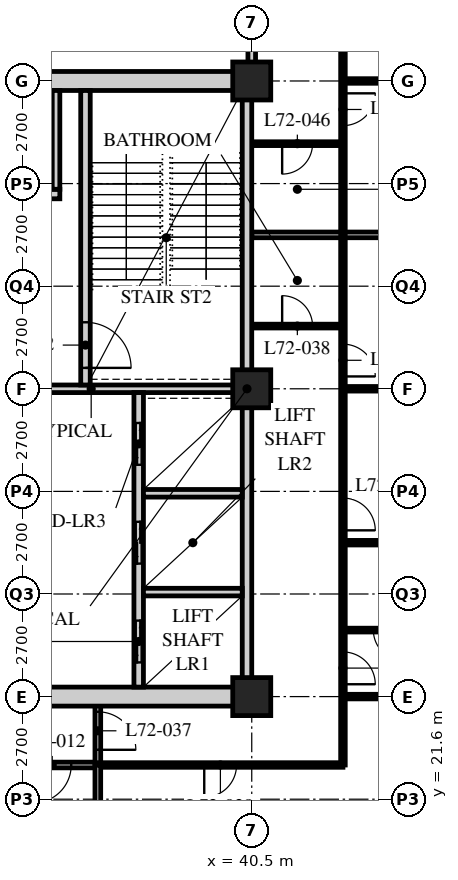
"""IFC4 building model, lengths in metres.
Left out: names, types, materials, properties, quantities, classifications, styles, units other than length and angle.
Written with IfcOpenShell. Run it as: python <this file> out.ifc"""

import sys

from ifc_helpers import new_model, si_unit, direction, frame, frame_2d, origin, origin_2d, place, context, subcontext, project, spatial, rectangle, hollow_rectangle, extrude, element, fill, save


model = new_model("IFC4")
c1 = context("Model", 3, precision=1e-05, world=origin(), true_north=direction((0.0, 1.0)))
c2 = subcontext(c1, "Body", "Model", "MODEL_VIEW")
j1 = project(units=[si_unit("LENGTHUNIT", "METRE"), si_unit("PLANEANGLEUNIT", "RADIAN")], contexts=[c1])
p1 = place(None, origin())
s1 = spatial("IfcSite", under=j1, at=p1, CompositionType="ELEMENT")
p2 = place(p1, origin())
s2 = spatial("IfcBuilding", under=s1, at=p2, CompositionType="ELEMENT")
p3 = place(p2, frame((0.0, 0.0, 281.4)))
s3 = spatial("IfcBuildingStorey", under=s2, at=p3, CompositionType="ELEMENT", Elevation=281.4)
for number, where, z_axis, x_axis in (
    (1, (40.5, 24.3, 0.0), (0.0, 0.0, 1.0), (1.0, 0.0, 0.0)),
    (2, (40.5, 32.4, 0.0), (0.0, 0.0, 1.0), (1.0, 0.0, 0.0)),
    (3, (40.5, 40.5, 0.0), (0.0, 0.0, 1.0), (1.0, 0.0, 0.0)),
):
    element("IfcColumn", number, at=place(p3, frame(where, z_axis=z_axis, x_axis=x_axis)), inside=s3, PredefinedType="COLUMN", context=c2, shape_type="SweptSolid", body=[
        extrude(hollow_rectangle(XDim=1.0, YDim=1.0, WallThickness=0.1, at=origin_2d()), origin(), (0.0, 0.0, 1.0), 3.9),
    ])
p4 = place(p3, frame((12.15, 22.5, 0.0), z_axis=(0.0, 0.0, 1.0), x_axis=(1.0, 0.0, 0.0)))
e4 = element("IfcWall", 4, at=p4, inside=s3, PredefinedType="PARTITIONING", context=c2, shape_type="SweptSolid", body=[
    extrude(rectangle(XDim=24.3, YDim=0.15, at=frame_2d((12.15, 0.0))), origin(), (0.0, 0.0, 1.0), 3.69),
])
p5 = place(p4, frame((4.45, 0.0, 0.0)))
e5 = element("IfcOpeningElement", 5, at=p5, cuts=e4, PredefinedType="OPENING", context=c2, shape_type="SweptSolid", body=[
    extrude(rectangle(XDim=1.0, YDim=2.1, at=frame_2d((0.5, 1.05))), frame((0.0, 0.085, 0.0), z_axis=(0.0, -1.0, 0.0), x_axis=(1.0, 0.0, 0.0)), (0.0, 0.0, 1.0), 0.17),
])
p6 = place(p4, frame((22.6, 0.0, 0.0)))
e6 = element("IfcOpeningElement", 6, at=p6, cuts=e4, PredefinedType="OPENING", context=c2, shape_type="SweptSolid", body=[
    extrude(rectangle(XDim=1.0, YDim=2.1, at=frame_2d((0.5, 1.05))), frame((0.0, 0.085, 0.0), z_axis=(0.0, -1.0, 0.0), x_axis=(1.0, 0.0, 0.0)), (0.0, 0.0, 1.0), 0.17),
])
p7 = place(p4, frame((2.625, 0.0, 0.0)))
e7 = element("IfcOpeningElement", 7, at=p7, cuts=e4, PredefinedType="OPENING", context=c2, shape_type="SweptSolid", body=[
    extrude(rectangle(XDim=1.0, YDim=2.1, at=frame_2d((0.5, 1.05))), frame((0.0, 0.085, 0.0), z_axis=(0.0, -1.0, 0.0), x_axis=(1.0, 0.0, 0.0)), (0.0, 0.0, 1.0), 0.17),
])
p8 = place(p3, frame((36.45, 22.5, 0.0), z_axis=(0.0, 0.0, 1.0), x_axis=(0.0, 1.0, 0.0)))
e8 = element("IfcWall", 8, at=p8, inside=s3, PredefinedType="PARTITIONING", context=c2, shape_type="SweptSolid", body=[
    extrude(rectangle(XDim=1.8, YDim=0.15, at=frame_2d((0.9, 0.0))), origin(), (0.0, 0.0, 1.0), 3.69),
])
p9 = place(p8, frame((0.4, 0.0, 0.0)))
e9 = element("IfcOpeningElement", 9, at=p9, cuts=e8, PredefinedType="OPENING", context=c2, shape_type="SweptSolid", body=[
    extrude(rectangle(XDim=1.0, YDim=2.1, at=frame_2d((0.5, 1.05))), frame((0.0, 0.085, 0.0), z_axis=(0.0, -1.0, 0.0), x_axis=(1.0, 0.0, 0.0)), (0.0, 0.0, 1.0), 0.17),
])
p10 = place(p3, frame((40.5, 40.5, 0.0), z_axis=(0.0, 0.0, 1.0), x_axis=(0.0, 1.0, 0.0)))
e10 = element("IfcWall", 10, at=p10, inside=s3, PredefinedType="SOLIDWALL", context=c2, shape_type="SweptSolid", body=[
    extrude(rectangle(XDim=6.3, YDim=0.2, at=frame_2d((3.15, 0.0))), origin(), (0.0, 0.0, 1.0), 3.078),
])
p11 = place(p3, frame((40.5, 34.05, 0.0), z_axis=(0.0, 0.0, 1.0), x_axis=(1.0, 0.0, 0.0)))
e11 = element("IfcWall", 11, at=p11, inside=s3, PredefinedType="PARTITIONING", context=c2, shape_type="SweptSolid", body=[
    extrude(rectangle(XDim=2.4, YDim=0.1, at=frame_2d((1.2, 0.0))), origin(), (0.0, 0.0, 1.0), 3.69),
])
p12 = place(p11, frame((0.8, 0.0, 0.0)))
e12 = element("IfcOpeningElement", 12, at=p12, cuts=e11, PredefinedType="OPENING", context=c2, shape_type="SweptSolid", body=[
    extrude(rectangle(XDim=0.8, YDim=2.1, at=frame_2d((0.4, 1.05))), frame((0.0, 0.06, 0.0), z_axis=(0.0, -1.0, 0.0), x_axis=(1.0, 0.0, 0.0)), (0.0, 0.0, 1.0), 0.12),
])
p13 = place(p3, frame((42.9, 22.5, 0.0), z_axis=(0.0, 0.0, 1.0), x_axis=(0.0, 1.0, 0.0)))
e13 = element("IfcWall", 13, at=p13, inside=s3, PredefinedType="PARTITIONING", context=c2, shape_type="SweptSolid", body=[
    extrude(rectangle(XDim=13.95, YDim=0.12, at=frame_2d((6.975, 0.0))), origin(), (0.0, 0.0, 1.0), 3.69),
])
p14 = place(p13, frame((2.125, 0.0, 0.0)))
e14 = element("IfcOpeningElement", 14, at=p14, cuts=e13, PredefinedType="OPENING", context=c2, shape_type="SweptSolid", body=[
    extrude(rectangle(XDim=0.85, YDim=2.1, at=frame_2d((0.425, 1.05))), frame((0.0, 0.07, 0.0), z_axis=(0.0, -1.0, 0.0), x_axis=(1.0, 0.0, 0.0)), (0.0, 0.0, 1.0), 0.14),
])
p15 = place(p13, frame((6.175, 0.0, 0.0)))
e15 = element("IfcOpeningElement", 15, at=p15, cuts=e13, PredefinedType="OPENING", context=c2, shape_type="SweptSolid", body=[
    extrude(rectangle(XDim=0.85, YDim=2.1, at=frame_2d((0.425, 1.05))), frame((0.0, 0.07, 0.0), z_axis=(0.0, -1.0, 0.0), x_axis=(1.0, 0.0, 0.0)), (0.0, 0.0, 1.0), 0.14),
])
p16 = place(p13, frame((10.225, 0.0, 0.0)))
e16 = element("IfcOpeningElement", 16, at=p16, cuts=e13, PredefinedType="OPENING", context=c2, shape_type="SweptSolid", body=[
    extrude(rectangle(XDim=0.85, YDim=2.1, at=frame_2d((0.425, 1.05))), frame((0.0, 0.07, 0.0), z_axis=(0.0, -1.0, 0.0), x_axis=(1.0, 0.0, 0.0)), (0.0, 0.0, 1.0), 0.14),
])
p17 = place(p3, frame((36.45, 22.5, 0.0), z_axis=(0.0, 0.0, 1.0), x_axis=(1.0, 0.0, 0.0)))
e17 = element("IfcWall", 17, at=p17, inside=s3, PredefinedType="PARTITIONING", context=c2, shape_type="SweptSolid", body=[
    extrude(rectangle(XDim=6.45, YDim=0.12, at=frame_2d((3.225, 0.0))), origin(), (0.0, 0.0, 1.0), 3.69),
])
p18 = place(p17, frame((2.8, 0.0, 0.0)))
e18 = element("IfcOpeningElement", 18, at=p18, cuts=e17, PredefinedType="OPENING", context=c2, shape_type="SweptSolid", body=[
    extrude(rectangle(XDim=0.85, YDim=2.1, at=frame_2d((0.425, 1.05))), frame((0.0, 0.07, 0.0), z_axis=(0.0, -1.0, 0.0), x_axis=(1.0, 0.0, 0.0)), (0.0, 0.0, 1.0), 0.14),
])
p19 = place(p3, frame((42.9, 24.3, 0.0), z_axis=(0.0, 0.0, 1.0), x_axis=(1.0, 0.0, 0.0)))
e19 = element("IfcWall", 19, at=p19, inside=s3, PredefinedType="PARTITIONING", context=c2, shape_type="SweptSolid", body=[
    extrude(rectangle(XDim=9.45, YDim=0.12, at=frame_2d((4.725, 0.0))), origin(), (0.0, 0.0, 1.0), 3.078),
])
p20 = place(p3, frame((40.5, 36.45, 0.0), z_axis=(0.0, 0.0, 1.0), x_axis=(1.0, 0.0, 0.0)))
e20 = element("IfcWall", 20, at=p20, inside=s3, PredefinedType="PARTITIONING", context=c2, shape_type="SweptSolid", body=[
    extrude(rectangle(XDim=15.9, YDim=0.15, at=frame_2d((7.95, 0.0))), origin(), (0.0, 0.0, 1.0), 3.69),
])
p21 = place(p3, frame((36.45, 16.5, 0.0), z_axis=(0.0, 0.0, 1.0), x_axis=(0.0, 1.0, 0.0)))
e21 = element("IfcWall", 21, at=p21, inside=s3, PredefinedType="PARTITIONING", context=c2, shape_type="SweptSolid", body=[
    extrude(rectangle(XDim=6.0, YDim=0.15, at=frame_2d((3.0, 0.0))), origin(), (0.0, 0.0, 1.0), 3.69),
])
p22 = place(p3, frame((42.9, 26.05, 0.0), z_axis=(0.0, 0.0, 1.0), x_axis=(1.0, 0.0, 0.0)))
e22 = element("IfcWall", 22, at=p22, inside=s3, PredefinedType="PARTITIONING", context=c2, shape_type="SweptSolid", body=[
    extrude(rectangle(XDim=2.4, YDim=0.1, at=frame_2d((1.2, 0.0))), origin(), (0.0, 0.0, 1.0), 3.69),
])
p23 = place(p22, frame((0.8, 0.0, 0.0)))
e23 = element("IfcOpeningElement", 23, at=p23, cuts=e22, PredefinedType="OPENING", context=c2, shape_type="SweptSolid", body=[
    extrude(rectangle(XDim=0.8, YDim=2.1, at=frame_2d((0.4, 1.05))), frame((0.0, 0.06, 0.0), z_axis=(0.0, -1.0, 0.0), x_axis=(1.0, 0.0, 0.0)), (0.0, 0.0, 1.0), 0.12),
])
p24 = place(p3, frame((42.9, 28.35, 0.0), z_axis=(0.0, 0.0, 1.0), x_axis=(1.0, 0.0, 0.0)))
e24 = element("IfcWall", 24, at=p24, inside=s3, PredefinedType="PARTITIONING", context=c2, shape_type="SweptSolid", body=[
    extrude(rectangle(XDim=13.5, YDim=0.12, at=frame_2d((6.75, 0.0))), origin(), (0.0, 0.0, 1.0), 3.69),
])
p25 = place(p3, frame((42.9, 32.4, 0.0), z_axis=(0.0, 0.0, 1.0), x_axis=(1.0, 0.0, 0.0)))
e25 = element("IfcWall", 25, at=p25, inside=s3, PredefinedType="PARTITIONING", context=c2, shape_type="SweptSolid", body=[
    extrude(rectangle(XDim=13.5, YDim=0.12, at=frame_2d((6.75, 0.0))), origin(), (0.0, 0.0, 1.0), 3.078),
])
p26 = place(p3, frame((40.5, 38.85, 0.0), z_axis=(0.0, 0.0, 1.0), x_axis=(1.0, 0.0, 0.0)))
e26 = element("IfcWall", 26, at=p26, inside=s3, PredefinedType="PARTITIONING", context=c2, shape_type="SweptSolid", body=[
    extrude(rectangle(XDim=2.4, YDim=0.1, at=frame_2d((1.2, 0.0))), origin(), (0.0, 0.0, 1.0), 3.69),
])
p27 = place(p26, frame((0.8, 0.0, 0.0)))
e27 = element("IfcOpeningElement", 27, at=p27, cuts=e26, PredefinedType="OPENING", context=c2, shape_type="SweptSolid", body=[
    extrude(rectangle(XDim=0.8, YDim=2.1, at=frame_2d((0.4, 1.05))), frame((0.0, 0.06, 0.0), z_axis=(0.0, -1.0, 0.0), x_axis=(1.0, 0.0, 0.0)), (0.0, 0.0, 1.0), 0.12),
])
p28 = place(p3, frame((42.9, 48.6, 0.0), z_axis=(0.0, 0.0, 1.0), x_axis=(0.0, -1.0, 0.0)))
e28 = element("IfcWall", 28, at=p28, inside=s3, PredefinedType="PARTITIONING", context=c2, shape_type="SweptSolid", body=[
    extrude(rectangle(XDim=12.15, YDim=0.12, at=frame_2d((6.075, 0.0))), origin(), (0.0, 0.0, 1.0), 3.69),
])
p29 = place(p28, frame((2.125, 0.0, 0.0)))
e29 = element("IfcOpeningElement", 29, at=p29, cuts=e28, PredefinedType="OPENING", context=c2, shape_type="SweptSolid", body=[
    extrude(rectangle(XDim=0.85, YDim=2.1, at=frame_2d((0.425, 1.05))), frame((0.0, 0.07, 0.0), z_axis=(0.0, -1.0, 0.0), x_axis=(1.0, 0.0, 0.0)), (0.0, 0.0, 1.0), 0.14),
])
p30 = place(p28, frame((8.425, 0.0, 0.0)))
e30 = element("IfcOpeningElement", 30, at=p30, cuts=e28, PredefinedType="OPENING", context=c2, shape_type="SweptSolid", body=[
    extrude(rectangle(XDim=0.85, YDim=2.1, at=frame_2d((0.425, 1.05))), frame((0.0, 0.07, 0.0), z_axis=(0.0, -1.0, 0.0), x_axis=(1.0, 0.0, 0.0)), (0.0, 0.0, 1.0), 0.14),
])
p31 = place(p3, frame((42.9, 40.5, 0.0), z_axis=(0.0, 0.0, 1.0), x_axis=(1.0, 0.0, 0.0)))
e31 = element("IfcWall", 31, at=p31, inside=s3, PredefinedType="PARTITIONING", context=c2, shape_type="SweptSolid", body=[
    extrude(rectangle(XDim=13.5, YDim=0.12, at=frame_2d((6.75, 0.0))), origin(), (0.0, 0.0, 1.0), 3.078),
])
p32 = place(p3, frame((15.95, 24.3, 0.0), z_axis=(0.0, 0.0, 1.0), x_axis=(1.0, 0.0, 0.0)))
e32 = element("IfcWall", 32, at=p32, inside=s3, PredefinedType="SOLIDWALL", context=c2, shape_type="SweptSolid", body=[
    extrude(rectangle(XDim=24.55, YDim=0.5, at=frame_2d((12.275, 0.0))), origin(), (0.0, 0.0, 1.0), 3.04),
])
p33 = place(p32, frame((11.5, 0.0, 0.0)))
e33 = element("IfcOpeningElement", 33, at=p33, cuts=e32, PredefinedType="OPENING", context=c2, shape_type="SweptSolid", body=[
    extrude(rectangle(XDim=1.8, YDim=2.4, at=frame_2d((0.9, 1.2))), frame((0.0, 0.26, 0.0), z_axis=(0.0, -1.0, 0.0), x_axis=(1.0, 0.0, 0.0)), (0.0, 0.0, 1.0), 0.52),
])
p34 = place(p3, frame((15.95, 40.5, 0.0), z_axis=(0.0, 0.0, 1.0), x_axis=(1.0, 0.0, 0.0)))
e34 = element("IfcWall", 34, at=p34, inside=s3, PredefinedType="SOLIDWALL", context=c2, shape_type="SweptSolid", body=[
    extrude(rectangle(XDim=24.55, YDim=0.5, at=frame_2d((12.275, 0.0))), origin(), (0.0, 0.0, 1.0), 3.04),
])
p35 = place(p34, frame((11.5, 0.0, 0.0)))
e35 = element("IfcOpeningElement", 35, at=p35, cuts=e34, PredefinedType="OPENING", context=c2, shape_type="SweptSolid", body=[
    extrude(rectangle(XDim=1.8, YDim=2.4, at=frame_2d((0.9, 1.2))), frame((0.0, 0.26, 0.0), z_axis=(0.0, -1.0, 0.0), x_axis=(1.0, 0.0, 0.0)), (0.0, 0.0, 1.0), 0.52),
])
p36 = place(p3, frame((40.375, 24.55, 0.0), z_axis=(0.0, 0.0, 1.0), x_axis=(0.0, 1.0, 0.0)))
e36 = element("IfcWall", 36, at=p36, inside=s3, PredefinedType="SOLIDWALL", context=c2, shape_type="SweptSolid", body=[
    extrude(rectangle(XDim=15.7, YDim=0.25, at=frame_2d((7.85, 0.0))), origin(), (0.0, 0.0, 1.0), 3.078),
])
p37 = place(p3, frame((32.3, 32.4, 0.0), z_axis=(0.0, 0.0, 1.0), x_axis=(1.0, 0.0, 0.0)))
e37 = element("IfcWall", 37, at=p37, inside=s3, PredefinedType="SOLIDWALL", context=c2, shape_type="SweptSolid", body=[
    extrude(rectangle(XDim=7.95, YDim=0.2, at=frame_2d((3.975, 0.0))), origin(), (0.0, 0.0, 1.0), 3.078),
])
p38 = place(p3, frame((37.525, 24.55, 0.0), z_axis=(0.0, 0.0, 1.0), x_axis=(0.0, 1.0, 0.0)))
e38 = element("IfcWall", 38, at=p38, inside=s3, PredefinedType="SOLIDWALL", context=c2, shape_type="SweptSolid", body=[
    extrude(rectangle(XDim=7.75, YDim=0.25, at=frame_2d((3.875, 0.0))), origin(), (0.0, 0.0, 1.0), 3.69),
])
p39 = place(p38, frame((0.65, 0.0, 0.0)))
e39 = element("IfcOpeningElement", 39, at=p39, cuts=e38, PredefinedType="OPENING", context=c2, shape_type="SweptSolid", body=[
    extrude(rectangle(XDim=1.1, YDim=2.4, at=frame_2d((0.55, 1.2))), frame((0.0, 0.135, 0.0), z_axis=(0.0, -1.0, 0.0), x_axis=(1.0, 0.0, 0.0)), (0.0, 0.0, 1.0), 0.27),
])
p40 = place(p38, frame((3.25, 0.0, 0.0)))
e40 = element("IfcOpeningElement", 40, at=p40, cuts=e38, PredefinedType="OPENING", context=c2, shape_type="SweptSolid", body=[
    extrude(rectangle(XDim=1.1, YDim=2.4, at=frame_2d((0.55, 1.2))), frame((0.0, 0.135, 0.0), z_axis=(0.0, -1.0, 0.0), x_axis=(1.0, 0.0, 0.0)), (0.0, 0.0, 1.0), 0.27),
])
p41 = place(p38, frame((5.85, 0.0, 0.0)))
e41 = element("IfcOpeningElement", 41, at=p41, cuts=e38, PredefinedType="OPENING", context=c2, shape_type="SweptSolid", body=[
    extrude(rectangle(XDim=1.1, YDim=2.4, at=frame_2d((0.55, 1.2))), frame((0.0, 0.135, 0.0), z_axis=(0.0, -1.0, 0.0), x_axis=(1.0, 0.0, 0.0)), (0.0, 0.0, 1.0), 0.27),
])
for number, where, z_axis, x_axis in (
    (42, (37.65, 27.05, 0.0), (0.0, 0.0, 1.0), (1.0, 0.0, 0.0)),
    (43, (37.65, 29.65, 0.0), (0.0, 0.0, 1.0), (1.0, 0.0, 0.0)),
):
    element("IfcWall", number, at=place(p3, frame(where, z_axis=z_axis, x_axis=x_axis)), inside=s3, PredefinedType="SOLIDWALL", context=c2, shape_type="SweptSolid", body=[
        extrude(rectangle(XDim=2.6, YDim=0.2, at=frame_2d((1.3, 0.0))), origin(), (0.0, 0.0, 1.0), 3.69),
    ])
p42 = place(p3, frame((36.125, 32.5, 0.0), z_axis=(0.0, 0.0, 1.0), x_axis=(0.0, 1.0, 0.0)))
e44 = element("IfcWall", 44, at=p42, inside=s3, PredefinedType="SOLIDWALL", context=c2, shape_type="SweptSolid", body=[
    extrude(rectangle(XDim=7.75, YDim=0.25, at=frame_2d((3.875, 0.0))), origin(), (0.0, 0.0, 1.0), 3.69),
])
p43 = place(p42, frame((0.45, 0.0, 0.0)))
e45 = element("IfcOpeningElement", 45, at=p43, cuts=e44, PredefinedType="OPENING", context=c2, shape_type="SweptSolid", body=[
    extrude(rectangle(XDim=1.2, YDim=2.1, at=frame_2d((0.6, 1.05))), frame((0.0, 0.135, 0.0), z_axis=(0.0, -1.0, 0.0), x_axis=(1.0, 0.0, 0.0)), (0.0, 0.0, 1.0), 0.27),
])
p44 = place(p3, frame((32.5, 37.525, 0.0), z_axis=(0.0, 0.0, 1.0), x_axis=(1.0, 0.0, 0.0)))
e46 = element("IfcWall", 46, at=p44, inside=s3, PredefinedType="SOLIDWALL", context=c2, shape_type="SweptSolid", body=[
    extrude(rectangle(XDim=2.95, YDim=0.25, at=frame_2d((1.475, 0.0))), origin(), (0.0, 0.0, 1.0), 3.69),
])
p45 = place(p44, frame((0.9, 0.0, 0.0)))
e47 = element("IfcOpeningElement", 47, at=p45, cuts=e46, PredefinedType="OPENING", context=c2, shape_type="SweptSolid", body=[
    extrude(rectangle(XDim=1.1, YDim=2.4, at=frame_2d((0.55, 1.2))), frame((0.0, 0.135, 0.0), z_axis=(0.0, -1.0, 0.0), x_axis=(1.0, 0.0, 0.0)), (0.0, 0.0, 1.0), 0.27),
])
p46 = place(p3, frame((35.35, 37.65, 0.0), z_axis=(0.0, 0.0, 1.0), x_axis=(0.0, 1.0, 0.0)))
e48 = element("IfcWall", 48, at=p46, inside=s3, PredefinedType="SOLIDWALL", context=c2, shape_type="SweptSolid", body=[
    extrude(rectangle(XDim=2.6, YDim=0.2, at=frame_2d((1.3, 0.0))), origin(), (0.0, 0.0, 1.0), 3.69),
])
p47 = place(p6, origin())
e49 = element("IfcDoor", 49, at=p47, inside=s3, OperationType="SINGLE_SWING_RIGHT", PredefinedType="DOOR", context=c2, shape_type="SweptSolid", body=[
    extrude(rectangle(XDim=1.0, YDim=2.1, at=frame_2d((0.5, 1.05))), frame((0.0, 0.025, 0.0), z_axis=(0.0, -1.0, 0.0), x_axis=(1.0, 0.0, 0.0)), (0.0, 0.0, 1.0), 0.05),
])
fill(e6, e49)
p48 = place(p9, origin())
e50 = element("IfcDoor", 50, at=p48, inside=s3, OperationType="SINGLE_SWING_RIGHT", PredefinedType="DOOR", context=c2, shape_type="SweptSolid", body=[
    extrude(rectangle(XDim=1.0, YDim=2.1, at=frame_2d((0.5, 1.05))), frame((0.0, 0.025, 0.0), z_axis=(0.0, -1.0, 0.0), x_axis=(1.0, 0.0, 0.0)), (0.0, 0.0, 1.0), 0.05),
])
fill(e9, e50)
p49 = place(p12, origin())
e51 = element("IfcDoor", 51, at=p49, inside=s3, OperationType="SINGLE_SWING_LEFT", PredefinedType="DOOR", context=c2, shape_type="SweptSolid", body=[
    extrude(rectangle(XDim=0.8, YDim=2.1, at=frame_2d((0.4, 1.05))), frame((0.0, 0.025, 0.0), z_axis=(0.0, -1.0, 0.0), x_axis=(1.0, 0.0, 0.0)), (0.0, 0.0, 1.0), 0.05),
])
fill(e12, e51)
p50 = place(p18, origin())
e52 = element("IfcDoor", 52, at=p50, inside=s3, OperationType="SINGLE_SWING_RIGHT", PredefinedType="DOOR", context=c2, shape_type="SweptSolid", body=[
    extrude(rectangle(XDim=0.85, YDim=2.1, at=frame_2d((0.425, 1.05))), frame((0.0, 0.025, 0.0), z_axis=(0.0, -1.0, 0.0), x_axis=(1.0, 0.0, 0.0)), (0.0, 0.0, 1.0), 0.05),
])
fill(e18, e52)
p51 = place(p23, origin())
e53 = element("IfcDoor", 53, at=p51, inside=s3, OperationType="SINGLE_SWING_LEFT", PredefinedType="DOOR", context=c2, shape_type="SweptSolid", body=[
    extrude(rectangle(XDim=0.8, YDim=2.1, at=frame_2d((0.4, 1.05))), frame((0.0, 0.025, 0.0), z_axis=(0.0, -1.0, 0.0), x_axis=(1.0, 0.0, 0.0)), (0.0, 0.0, 1.0), 0.05),
])
fill(e23, e53)
p52 = place(p14, origin())
e54 = element("IfcDoor", 54, at=p52, inside=s3, OperationType="SINGLE_SWING_RIGHT", PredefinedType="DOOR", context=c2, shape_type="SweptSolid", body=[
    extrude(rectangle(XDim=0.85, YDim=2.1, at=frame_2d((0.425, 1.05))), frame((0.0, 0.025, 0.0), z_axis=(0.0, -1.0, 0.0), x_axis=(1.0, 0.0, 0.0)), (0.0, 0.0, 1.0), 0.05),
])
fill(e14, e54)
p53 = place(p15, origin())
e55 = element("IfcDoor", 55, at=p53, inside=s3, OperationType="SINGLE_SWING_RIGHT", PredefinedType="DOOR", context=c2, shape_type="SweptSolid", body=[
    extrude(rectangle(XDim=0.85, YDim=2.1, at=frame_2d((0.425, 1.05))), frame((0.0, 0.025, 0.0), z_axis=(0.0, -1.0, 0.0), x_axis=(1.0, 0.0, 0.0)), (0.0, 0.0, 1.0), 0.05),
])
fill(e15, e55)
p54 = place(p16, origin())
e56 = element("IfcDoor", 56, at=p54, inside=s3, OperationType="SINGLE_SWING_RIGHT", PredefinedType="DOOR", context=c2, shape_type="SweptSolid", body=[
    extrude(rectangle(XDim=0.85, YDim=2.1, at=frame_2d((0.425, 1.05))), frame((0.0, 0.025, 0.0), z_axis=(0.0, -1.0, 0.0), x_axis=(1.0, 0.0, 0.0)), (0.0, 0.0, 1.0), 0.05),
])
fill(e16, e56)
p55 = place(p27, origin())
e57 = element("IfcDoor", 57, at=p55, inside=s3, OperationType="SINGLE_SWING_RIGHT", PredefinedType="DOOR", context=c2, shape_type="SweptSolid", body=[
    extrude(rectangle(XDim=0.8, YDim=2.1, at=frame_2d((0.4, 1.05))), frame((0.0, 0.025, 0.0), z_axis=(0.0, -1.0, 0.0), x_axis=(1.0, 0.0, 0.0)), (0.0, 0.0, 1.0), 0.05),
])
fill(e27, e57)
p56 = place(p30, origin())
e58 = element("IfcDoor", 58, at=p56, inside=s3, OperationType="SINGLE_SWING_LEFT", PredefinedType="DOOR", context=c2, shape_type="SweptSolid", body=[
    extrude(rectangle(XDim=0.85, YDim=2.1, at=frame_2d((0.425, 1.05))), frame((0.0, 0.025, 0.0), z_axis=(0.0, -1.0, 0.0), x_axis=(1.0, 0.0, 0.0)), (0.0, 0.0, 1.0), 0.05),
])
fill(e30, e58)
p57 = place(p43, origin())
e59 = element("IfcDoor", 59, at=p57, inside=s3, OperationType="SINGLE_SWING_RIGHT", PredefinedType="DOOR", context=c2, shape_type="SweptSolid", body=[
    extrude(rectangle(XDim=1.2, YDim=2.1, at=frame_2d((0.6, 1.05))), frame((0.0, 0.025, 0.0), z_axis=(0.0, -1.0, 0.0), x_axis=(1.0, 0.0, 0.0)), (0.0, 0.0, 1.0), 0.05),
])
fill(e45, e59)
p58 = place(p39, origin())
e60 = element("IfcDoor", 60, at=p58, inside=s3, OperationType="DOUBLE_DOOR_SLIDING", PredefinedType="DOOR", context=c2, shape_type="SweptSolid", body=[
    extrude(rectangle(XDim=1.1, YDim=2.4, at=frame_2d((0.55, 1.2))), frame((0.0, 0.025, 0.0), z_axis=(0.0, -1.0, 0.0), x_axis=(1.0, 0.0, 0.0)), (0.0, 0.0, 1.0), 0.05),
])
fill(e39, e60)
p59 = place(p40, origin())
e61 = element("IfcDoor", 61, at=p59, inside=s3, OperationType="DOUBLE_DOOR_SLIDING", PredefinedType="DOOR", context=c2, shape_type="SweptSolid", body=[
    extrude(rectangle(XDim=1.1, YDim=2.4, at=frame_2d((0.55, 1.2))), frame((0.0, 0.025, 0.0), z_axis=(0.0, -1.0, 0.0), x_axis=(1.0, 0.0, 0.0)), (0.0, 0.0, 1.0), 0.05),
])
fill(e40, e61)
p60 = place(p41, origin())
e62 = element("IfcDoor", 62, at=p60, inside=s3, OperationType="DOUBLE_DOOR_SLIDING", PredefinedType="DOOR", context=c2, shape_type="SweptSolid", body=[
    extrude(rectangle(XDim=1.1, YDim=2.4, at=frame_2d((0.55, 1.2))), frame((0.0, 0.025, 0.0), z_axis=(0.0, -1.0, 0.0), x_axis=(1.0, 0.0, 0.0)), (0.0, 0.0, 1.0), 0.05),
])
fill(e41, e62)
save(model, sys.argv[1])
